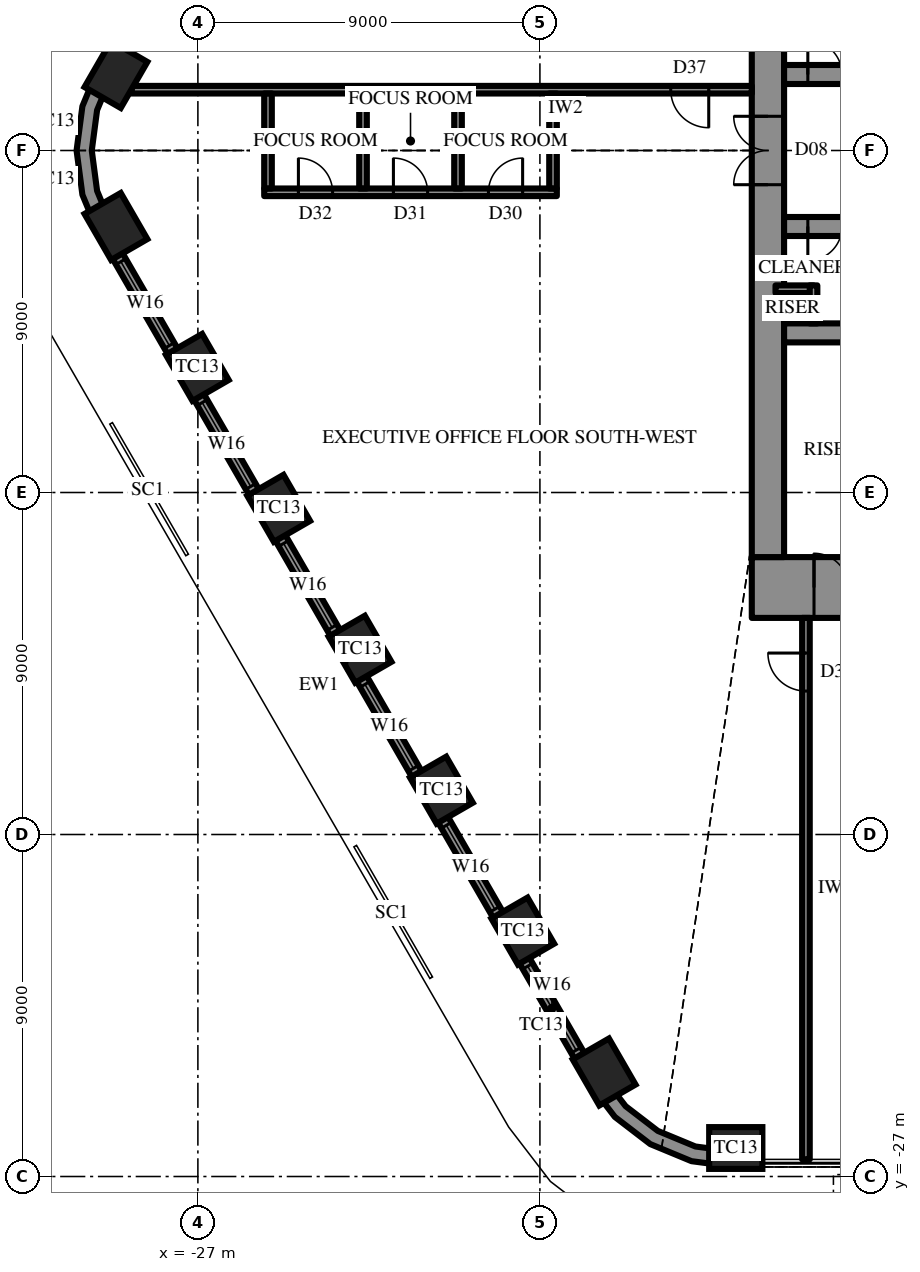
"""IFC4 building model, lengths in metres.
Left out: names, types, materials, properties, quantities, classifications, styles, units other than length and angle.
Written with IfcOpenShell. Run it as: python <this file> out.ifc"""

import sys

from ifc_helpers import new_model, si_unit, direction, frame, frame_2d, origin, origin_2d, place, context, subcontext, project, spatial, polyline, rectangle, outline, extrude, element, fill, save


model = new_model("IFC4")
c1 = context("Model", 3, precision=1e-05, world=origin(), true_north=direction((0.0, 1.0)))
c2 = subcontext(c1, "Body", "Model", "MODEL_VIEW")
j1 = project(units=[si_unit("LENGTHUNIT", "METRE"), si_unit("PLANEANGLEUNIT", "RADIAN")], contexts=[c1])
p1 = place(None, origin())
s1 = spatial("IfcSite", under=j1, at=p1, CompositionType="ELEMENT")
p2 = place(p1, origin())
s2 = spatial("IfcBuilding", under=s1, at=p2, CompositionType="ELEMENT")
p3 = place(p2, frame((0.0, 0.0, 324.1)))
s3 = spatial("IfcBuildingStorey", under=s2, at=p3, CompositionType="ELEMENT", Elevation=324.1)
for number, where, z_axis, x_axis in (
    (1, (-29.156, 2.0, 0.0), (0.0, 0.0, 1.0), (-0.5, -0.866, 0.0)),
    (2, (-29.156, -2.0, 0.0), (0.0, 0.0, 1.0), (0.5, -0.866, 0.0)),
    (3, (-27.015, -5.708, 0.0), (0.0, 0.0, 1.0), (0.5, -0.866, 0.0)),
    (4, (-24.874, -9.417, 0.0), (0.0, 0.0, 1.0), (0.5, -0.866, 0.0)),
    (5, (-22.733, -13.125, 0.0), (0.0, 0.0, 1.0), (0.5, -0.866, 0.0)),
    (6, (-20.592, -16.833, 0.0), (0.0, 0.0, 1.0), (0.5, -0.866, 0.0)),
    (7, (-18.451, -20.542, 0.0), (0.0, 0.0, 1.0), (0.5, -0.866, 0.0)),
    (8, (-16.31, -24.25, 0.0), (0.0, 0.0, 1.0), (0.5, -0.866, 0.0)),
    (9, (-12.846, -26.25, 0.0), (0.0, 0.0, 1.0), (1.0, 0.0, 0.0)),
):
    element("IfcColumn", number, at=place(p3, frame(where, z_axis=z_axis, x_axis=x_axis)), inside=s3, PredefinedType="COLUMN", context=c2, shape_type="SweptSolid", body=[
        extrude(rectangle(XDim=1.4, YDim=1.1, at=origin_2d()), origin(), (0.0, 0.0, 1.0), 4.2),
    ])
p4 = place(p3, frame((12.425, -11.5, 0.0), z_axis=(0.0, 0.0, 1.0), x_axis=(-1.0, 0.0, 0.0)))
e10 = element("IfcWall", 10, at=p4, inside=s3, PredefinedType="SHEAR", context=c2, shape_type="SweptSolid", body=[
    extrude(rectangle(XDim=24.85, YDim=1.6, at=frame_2d((12.425, 0.0))), origin(), (0.0, 0.0, 1.0), 4.2),
])
p5 = place(p4, frame((13.275, 0.0, 0.0)))
e11 = element("IfcOpeningElement", 11, at=p5, cuts=e10, PredefinedType="OPENING", context=c2, shape_type="SweptSolid", body=[
    extrude(rectangle(XDim=0.9, YDim=2.2, at=frame_2d((0.45, 1.1))), frame((0.0, 0.81, 0.0), z_axis=(0.0, -1.0, 0.0), x_axis=(1.0, 0.0, 0.0)), (0.0, 0.0, 1.0), 1.62),
])
p6 = place(p4, frame((16.275, 0.0, 0.0)))
e12 = element("IfcOpeningElement", 12, at=p6, cuts=e10, PredefinedType="OPENING", context=c2, shape_type="SweptSolid", body=[
    extrude(rectangle(XDim=0.9, YDim=2.2, at=frame_2d((0.45, 1.1))), frame((0.0, 0.81, 0.0), z_axis=(0.0, -1.0, 0.0), x_axis=(1.0, 0.0, 0.0)), (0.0, 0.0, 1.0), 1.62),
])
p7 = place(p4, frame((19.325, 0.0, 0.0)))
e13 = element("IfcOpeningElement", 13, at=p7, cuts=e10, PredefinedType="OPENING", context=c2, shape_type="SweptSolid", body=[
    extrude(rectangle(XDim=1.0, YDim=2.2, at=frame_2d((0.5, 1.1))), frame((0.0, 0.81, 0.0), z_axis=(0.0, -1.0, 0.0), x_axis=(1.0, 0.0, 0.0)), (0.0, 0.0, 1.0), 1.62),
])
p8 = place(p4, frame((1.637, 0.0, 0.0)))
e14 = element("IfcOpeningElement", 14, at=p8, cuts=e10, PredefinedType="OPENING", context=c2, shape_type="SweptSolid", body=[
    extrude(rectangle(XDim=0.9, YDim=2.2, at=frame_2d((0.45, 1.1))), frame((0.0, 0.81, 0.0), z_axis=(0.0, -1.0, 0.0), x_axis=(1.0, 0.0, 0.0)), (0.0, 0.0, 1.0), 1.62),
])
p9 = place(p4, frame((22.312, 0.0, 0.0)))
e15 = element("IfcOpeningElement", 15, at=p9, cuts=e10, PredefinedType="OPENING", context=c2, shape_type="SweptSolid", body=[
    extrude(rectangle(XDim=0.9, YDim=2.2, at=frame_2d((0.45, 1.1))), frame((0.0, 0.81, 0.0), z_axis=(0.0, -1.0, 0.0), x_axis=(1.0, 0.0, 0.0)), (0.0, 0.0, 1.0), 1.62),
])
p10 = place(p3, frame((-12.0, 10.7, 0.0), z_axis=(0.0, 0.0, 1.0), x_axis=(0.0, -1.0, 0.0)))
e16 = element("IfcWall", 16, at=p10, inside=s3, PredefinedType="SHEAR", context=c2, shape_type="SweptSolid", body=[
    extrude(rectangle(XDim=21.4, YDim=0.85, at=frame_2d((10.7, 0.0))), origin(), (0.0, 0.0, 1.0), 4.2),
])
p11 = place(p10, frame((9.8, 0.0, 0.0)))
e17 = element("IfcOpeningElement", 17, at=p11, cuts=e16, PredefinedType="OPENING", context=c2, shape_type="SweptSolid", body=[
    extrude(rectangle(XDim=1.8, YDim=2.4, at=frame_2d((0.9, 1.2))), frame((0.0, 0.435, 0.0), z_axis=(0.0, -1.0, 0.0), x_axis=(1.0, 0.0, 0.0)), (0.0, 0.0, 1.0), 0.87),
])
p12 = place(p3, frame((-11.575, 2.0, 0.0), z_axis=(0.0, 0.0, 1.0), x_axis=(1.0, 0.0, 0.0)))
e18 = element("IfcWall", 18, at=p12, inside=s3, PredefinedType="SHEAR", context=c2, shape_type="SweptSolid", body=[
    extrude(rectangle(XDim=5.775, YDim=0.5, at=frame_2d((2.887, 0.0))), origin(), (0.0, 0.0, 1.0), 4.2),
])
p13 = place(p12, frame((0.625, 0.0, 0.0)))
e19 = element("IfcOpeningElement", 19, at=p13, cuts=e18, PredefinedType="OPENING", context=c2, shape_type="SweptSolid", body=[
    extrude(rectangle(XDim=0.9, YDim=2.2, at=frame_2d((0.45, 1.1))), frame((0.0, 0.26, 0.0), z_axis=(0.0, -1.0, 0.0), x_axis=(1.0, 0.0, 0.0)), (0.0, 0.0, 1.0), 0.52),
])
p14 = place(p3, frame((3.2, -2.0, 0.0), z_axis=(0.0, 0.0, 1.0), x_axis=(-1.0, 0.0, 0.0)))
e20 = element("IfcWall", 20, at=p14, inside=s3, PredefinedType="SHEAR", context=c2, shape_type="SweptSolid", body=[
    extrude(rectangle(XDim=14.775, YDim=0.5, at=frame_2d((7.387, 0.0))), origin(), (0.0, 0.0, 1.0), 4.2),
])
p15 = place(p14, frame((13.25, 0.0, 0.0)))
e21 = element("IfcOpeningElement", 21, at=p15, cuts=e20, PredefinedType="OPENING", context=c2, shape_type="SweptSolid", body=[
    extrude(rectangle(XDim=0.9, YDim=2.2, at=frame_2d((0.45, 1.1))), frame((0.0, 0.26, 0.0), z_axis=(0.0, -1.0, 0.0), x_axis=(1.0, 0.0, 0.0)), (0.0, 0.0, 1.0), 0.52),
])
p16 = place(p14, frame((1.15, 0.0, 0.0)))
e22 = element("IfcOpeningElement", 22, at=p16, cuts=e20, PredefinedType="OPENING", context=c2, shape_type="SweptSolid", body=[
    extrude(rectangle(XDim=1.1, YDim=2.2, at=frame_2d((0.55, 1.1))), frame((0.0, 0.26, 0.0), z_axis=(0.0, -1.0, 0.0), x_axis=(1.0, 0.0, 0.0)), (0.0, 0.0, 1.0), 0.52),
])
p17 = place(p14, frame((4.15, 0.0, 0.0)))
e23 = element("IfcOpeningElement", 23, at=p17, cuts=e20, PredefinedType="OPENING", context=c2, shape_type="SweptSolid", body=[
    extrude(rectangle(XDim=1.1, YDim=2.2, at=frame_2d((0.55, 1.1))), frame((0.0, 0.26, 0.0), z_axis=(0.0, -1.0, 0.0), x_axis=(1.0, 0.0, 0.0)), (0.0, 0.0, 1.0), 0.52),
])
p18 = place(p14, frame((7.15, 0.0, 0.0)))
e24 = element("IfcOpeningElement", 24, at=p18, cuts=e20, PredefinedType="OPENING", context=c2, shape_type="SweptSolid", body=[
    extrude(rectangle(XDim=1.1, YDim=2.2, at=frame_2d((0.55, 1.1))), frame((0.0, 0.26, 0.0), z_axis=(0.0, -1.0, 0.0), x_axis=(1.0, 0.0, 0.0)), (0.0, 0.0, 1.0), 0.52),
])
p19 = place(p14, frame((10.15, 0.0, 0.0)))
e25 = element("IfcOpeningElement", 25, at=p19, cuts=e20, PredefinedType="OPENING", context=c2, shape_type="SweptSolid", body=[
    extrude(rectangle(XDim=1.1, YDim=2.2, at=frame_2d((0.55, 1.1))), frame((0.0, 0.26, 0.0), z_axis=(0.0, -1.0, 0.0), x_axis=(1.0, 0.0, 0.0)), (0.0, 0.0, 1.0), 0.52),
])
p20 = place(p3, frame((11.575, -4.8, 0.0), z_axis=(0.0, 0.0, 1.0), x_axis=(-1.0, 0.0, 0.0)))
e26 = element("IfcWall", 26, at=p20, inside=s3, PredefinedType="SHEAR", context=c2, shape_type="SweptSolid", body=[
    extrude(rectangle(XDim=23.15, YDim=0.5, at=frame_2d((11.575, 0.0))), origin(), (0.0, 0.0, 1.0), 4.2),
])
p21 = place(p20, frame((6.475, 0.0, 0.0)))
e27 = element("IfcOpeningElement", 27, at=p21, cuts=e26, PredefinedType="OPENING", context=c2, shape_type="SweptSolid", body=[
    extrude(rectangle(XDim=1.2, YDim=2.2, at=frame_2d((0.6, 1.1))), frame((0.0, 0.26, 0.0), z_axis=(0.0, -1.0, 0.0), x_axis=(1.0, 0.0, 0.0)), (0.0, 0.0, 1.0), 0.52),
])
p22 = place(p20, frame((3.475, 0.0, 0.0)))
e28 = element("IfcOpeningElement", 28, at=p22, cuts=e26, PredefinedType="OPENING", context=c2, shape_type="SweptSolid", body=[
    extrude(rectangle(XDim=1.2, YDim=2.2, at=frame_2d((0.6, 1.1))), frame((0.0, 0.26, 0.0), z_axis=(0.0, -1.0, 0.0), x_axis=(1.0, 0.0, 0.0)), (0.0, 0.0, 1.0), 0.52),
])
p23 = place(p3, origin())
e29 = element("IfcWall", 29, at=p23, inside=s3, PredefinedType="SOLIDWALL", context=c2, shape_type="SweptSolid", body=[
    extrude(outline(polyline([(-29.589, 2.25), (-30.039, 1.165), (-30.192, 0.0), (-30.039, -1.165), (-29.589, -2.25), (-29.243, -2.05), (-29.652, -1.061), (-29.792, 0.0), (-29.652, 1.061), (-29.243, 2.05), (-29.589, 2.25)])), origin(), (0.0, 0.0, 1.0), 2.0),
])
p24 = place(p3, origin())
e30 = element("IfcWall", 30, at=p24, inside=s3, PredefinedType="SOLIDWALL", context=c2, shape_type="SweptSolid", body=[
    extrude(outline(polyline([(-16.743, -24.5), (-16.028, -25.432), (-15.096, -26.147), (-14.011, -26.597), (-12.846, -26.75), (-12.846, -26.35), (-13.907, -26.21), (-14.896, -25.801), (-15.745, -25.149), (-16.397, -24.3), (-16.743, -24.5)])), origin(), (0.0, 0.0, 1.0), 2.0),
])
p25 = place(p3, frame((-29.459, -2.175, 0.0), z_axis=(0.0, 0.0, 1.0), x_axis=(0.499997191038, -0.866027025533, 0.0)))
e31 = element("IfcWall", 31, at=p25, inside=s3, PredefinedType="SOLIDWALL", context=c2, shape_type="SweptSolid", body=[
    extrude(rectangle(XDim=25.692, YDim=0.3, at=frame_2d((12.846, 0.0))), origin(), (0.0, 0.0, 1.0), 2.0),
])
p26 = place(p25, frame((0.866, 0.0, 0.6)))
e32 = element("IfcOpeningElement", 32, at=p26, cuts=e31, PredefinedType="OPENING", context=c2, shape_type="SweptSolid", body=[
    extrude(rectangle(XDim=2.55, YDim=1.15, at=frame_2d((1.275, 0.575))), frame((0.0, 0.16, 0.0), z_axis=(0.0, -1.0, 0.0), x_axis=(1.0, 0.0, 0.0)), (0.0, 0.0, 1.0), 0.32),
])
p27 = place(p25, frame((5.148, 0.0, 0.6)))
e33 = element("IfcOpeningElement", 33, at=p27, cuts=e31, PredefinedType="OPENING", context=c2, shape_type="SweptSolid", body=[
    extrude(rectangle(XDim=2.55, YDim=1.15, at=frame_2d((1.275, 0.575))), frame((0.0, 0.16, 0.0), z_axis=(0.0, -1.0, 0.0), x_axis=(1.0, 0.0, 0.0)), (0.0, 0.0, 1.0), 0.32),
])
p28 = place(p25, frame((9.43, 0.0, 0.6)))
e34 = element("IfcOpeningElement", 34, at=p28, cuts=e31, PredefinedType="OPENING", context=c2, shape_type="SweptSolid", body=[
    extrude(rectangle(XDim=2.55, YDim=1.15, at=frame_2d((1.275, 0.575))), frame((0.0, 0.16, 0.0), z_axis=(0.0, -1.0, 0.0), x_axis=(1.0, 0.0, 0.0)), (0.0, 0.0, 1.0), 0.32),
])
p29 = place(p25, frame((13.712, 0.0, 0.6)))
e35 = element("IfcOpeningElement", 35, at=p29, cuts=e31, PredefinedType="OPENING", context=c2, shape_type="SweptSolid", body=[
    extrude(rectangle(XDim=2.55, YDim=1.15, at=frame_2d((1.275, 0.575))), frame((0.0, 0.16, 0.0), z_axis=(0.0, -1.0, 0.0), x_axis=(1.0, 0.0, 0.0)), (0.0, 0.0, 1.0), 0.32),
])
p30 = place(p25, frame((17.994, 0.0, 0.6)))
e36 = element("IfcOpeningElement", 36, at=p30, cuts=e31, PredefinedType="OPENING", context=c2, shape_type="SweptSolid", body=[
    extrude(rectangle(XDim=2.55, YDim=1.15, at=frame_2d((1.275, 0.575))), frame((0.0, 0.16, 0.0), z_axis=(0.0, -1.0, 0.0), x_axis=(1.0, 0.0, 0.0)), (0.0, 0.0, 1.0), 0.32),
])
p31 = place(p25, frame((22.276, 0.0, 0.6)))
e37 = element("IfcOpeningElement", 37, at=p31, cuts=e31, PredefinedType="OPENING", context=c2, shape_type="SweptSolid", body=[
    extrude(rectangle(XDim=2.55, YDim=1.15, at=frame_2d((1.275, 0.575))), frame((0.0, 0.16, 0.0), z_axis=(0.0, -1.0, 0.0), x_axis=(1.0, 0.0, 0.0)), (0.0, 0.0, 1.0), 0.32),
])
for number, where, z_axis, x_axis in (
    (38, (-10.8, -3.65, 0.0), (0.0, 0.0, 1.0), (-1.0, 0.0, 0.0)),
    (39, (-10.8, -3.55, 0.0), (0.0, 0.0, 1.0), (0.0, -1.0, 0.0)),
):
    element("IfcWall", number, at=place(p3, frame(where, z_axis=z_axis, x_axis=x_axis)), inside=s3, PredefinedType="PARTITIONING", context=c2, shape_type="SweptSolid", body=[
        extrude(rectangle(XDim=1.0, YDim=0.2, at=frame_2d((0.5, 0.0))), origin(), (0.0, 0.0, 1.0), 4.0),
    ])
p32 = place(p3, frame((-11.0, -12.3, 0.0), z_axis=(0.0, 0.0, 1.0), x_axis=(0.0, -1.0, 0.0)))
e40 = element("IfcWall", 40, at=p32, inside=s3, PredefinedType="PARTITIONING", context=c2, shape_type="SweptSolid", body=[
    extrude(rectangle(XDim=14.25, YDim=0.2, at=frame_2d((7.125, 0.0))), origin(), (0.0, 0.0, 1.0), 4.0),
])
p33 = place(p32, frame((0.925, 0.0, 0.0)))
e41 = element("IfcOpeningElement", 41, at=p33, cuts=e40, PredefinedType="OPENING", context=c2, shape_type="SweptSolid", body=[
    extrude(rectangle(XDim=1.0, YDim=2.2, at=frame_2d((0.5, 1.1))), frame((0.0, 0.11, 0.0), z_axis=(0.0, -1.0, 0.0), x_axis=(1.0, 0.0, 0.0)), (0.0, 0.0, 1.0), 0.22),
])
p34 = place(p3, frame((-12.425, 1.6, 0.0), z_axis=(0.0, 0.0, 1.0), x_axis=(-1.0, 0.0, 0.0)))
e42 = element("IfcWall", 42, at=p34, inside=s3, PredefinedType="PARTITIONING", context=c2, shape_type="SweptSolid", body=[
    extrude(rectangle(XDim=16.327, YDim=0.2, at=frame_2d((8.164, 0.0))), origin(), (0.0, 0.0, 1.0), 4.0),
])
p35 = place(p34, frame((1.133, 0.0, 0.0)))
e43 = element("IfcOpeningElement", 43, at=p35, cuts=e42, PredefinedType="OPENING", context=c2, shape_type="SweptSolid", body=[
    extrude(rectangle(XDim=1.0, YDim=2.2, at=frame_2d((0.5, 1.1))), frame((0.0, 0.11, 0.0), z_axis=(0.0, -1.0, 0.0), x_axis=(1.0, 0.0, 0.0)), (0.0, 0.0, 1.0), 0.22),
])
p36 = place(p3, frame((-17.555, -1.1, 0.0), z_axis=(0.0, 0.0, 1.0), x_axis=(-1.0, 0.0, 0.0)))
e44 = element("IfcWall", 44, at=p36, inside=s3, PredefinedType="PARTITIONING", context=c2, shape_type="SweptSolid", body=[
    extrude(rectangle(XDim=7.7, YDim=0.2, at=frame_2d((3.85, 0.0))), origin(), (0.0, 0.0, 1.0), 4.0),
])
p37 = place(p36, frame((0.9, 0.0, 0.0)))
e45 = element("IfcOpeningElement", 45, at=p37, cuts=e44, PredefinedType="OPENING", context=c2, shape_type="SweptSolid", body=[
    extrude(rectangle(XDim=0.9, YDim=2.2, at=frame_2d((0.45, 1.1))), frame((0.0, 0.11, 0.0), z_axis=(0.0, -1.0, 0.0), x_axis=(1.0, 0.0, 0.0)), (0.0, 0.0, 1.0), 0.22),
])
p38 = place(p36, frame((3.4, 0.0, 0.0)))
e46 = element("IfcOpeningElement", 46, at=p38, cuts=e44, PredefinedType="OPENING", context=c2, shape_type="SweptSolid", body=[
    extrude(rectangle(XDim=0.9, YDim=2.2, at=frame_2d((0.45, 1.1))), frame((0.0, 0.11, 0.0), z_axis=(0.0, -1.0, 0.0), x_axis=(1.0, 0.0, 0.0)), (0.0, 0.0, 1.0), 0.22),
])
p39 = place(p36, frame((5.9, 0.0, 0.0)))
e47 = element("IfcOpeningElement", 47, at=p39, cuts=e44, PredefinedType="OPENING", context=c2, shape_type="SweptSolid", body=[
    extrude(rectangle(XDim=0.9, YDim=2.2, at=frame_2d((0.45, 1.1))), frame((0.0, 0.11, 0.0), z_axis=(0.0, -1.0, 0.0), x_axis=(1.0, 0.0, 0.0)), (0.0, 0.0, 1.0), 0.22),
])
for number, where, z_axis, x_axis in (
    (48, (-17.655, 1.5, 0.0), (0.0, 0.0, 1.0), (0.0, -1.0, 0.0)),
    (49, (-20.155, 1.5, 0.0), (0.0, 0.0, 1.0), (0.0, -1.0, 0.0)),
    (50, (-22.655, 1.5, 0.0), (0.0, 0.0, 1.0), (0.0, -1.0, 0.0)),
    (51, (-25.155, 1.5, 0.0), (0.0, 0.0, 1.0), (0.0, -1.0, 0.0)),
):
    element("IfcWall", number, at=place(p3, frame(where, z_axis=z_axis, x_axis=x_axis)), inside=s3, PredefinedType="PARTITIONING", context=c2, shape_type="SweptSolid", body=[
        extrude(rectangle(XDim=2.5, YDim=0.2, at=frame_2d((1.25, 0.0))), origin(), (0.0, 0.0, 1.0), 4.0),
    ])
p40 = place(p26, origin())
e52 = element("IfcWindow", 52, at=p40, inside=s3, PartitioningType="SINGLE_PANEL", PredefinedType="WINDOW", context=c2, shape_type="SweptSolid", body=[
    extrude(rectangle(XDim=2.55, YDim=1.15, at=frame_2d((1.275, 0.575))), frame((0.0, 0.03, 0.0), z_axis=(0.0, -1.0, 0.0), x_axis=(1.0, 0.0, 0.0)), (0.0, 0.0, 1.0), 0.06),
])
fill(e32, e52)
p41 = place(p27, origin())
e53 = element("IfcWindow", 53, at=p41, inside=s3, PartitioningType="SINGLE_PANEL", PredefinedType="WINDOW", context=c2, shape_type="SweptSolid", body=[
    extrude(rectangle(XDim=2.55, YDim=1.15, at=frame_2d((1.275, 0.575))), frame((0.0, 0.03, 0.0), z_axis=(0.0, -1.0, 0.0), x_axis=(1.0, 0.0, 0.0)), (0.0, 0.0, 1.0), 0.06),
])
fill(e33, e53)
p42 = place(p28, origin())
e54 = element("IfcWindow", 54, at=p42, inside=s3, PartitioningType="SINGLE_PANEL", PredefinedType="WINDOW", context=c2, shape_type="SweptSolid", body=[
    extrude(rectangle(XDim=2.55, YDim=1.15, at=frame_2d((1.275, 0.575))), frame((0.0, 0.03, 0.0), z_axis=(0.0, -1.0, 0.0), x_axis=(1.0, 0.0, 0.0)), (0.0, 0.0, 1.0), 0.06),
])
fill(e34, e54)
p43 = place(p29, origin())
e55 = element("IfcWindow", 55, at=p43, inside=s3, PartitioningType="SINGLE_PANEL", PredefinedType="WINDOW", context=c2, shape_type="SweptSolid", body=[
    extrude(rectangle(XDim=2.55, YDim=1.15, at=frame_2d((1.275, 0.575))), frame((0.0, 0.03, 0.0), z_axis=(0.0, -1.0, 0.0), x_axis=(1.0, 0.0, 0.0)), (0.0, 0.0, 1.0), 0.06),
])
fill(e35, e55)
p44 = place(p30, origin())
e56 = element("IfcWindow", 56, at=p44, inside=s3, PartitioningType="SINGLE_PANEL", PredefinedType="WINDOW", context=c2, shape_type="SweptSolid", body=[
    extrude(rectangle(XDim=2.55, YDim=1.15, at=frame_2d((1.275, 0.575))), frame((0.0, 0.03, 0.0), z_axis=(0.0, -1.0, 0.0), x_axis=(1.0, 0.0, 0.0)), (0.0, 0.0, 1.0), 0.06),
])
fill(e36, e56)
p45 = place(p31, origin())
e57 = element("IfcWindow", 57, at=p45, inside=s3, PartitioningType="SINGLE_PANEL", PredefinedType="WINDOW", context=c2, shape_type="SweptSolid", body=[
    extrude(rectangle(XDim=2.55, YDim=1.15, at=frame_2d((1.275, 0.575))), frame((0.0, 0.03, 0.0), z_axis=(0.0, -1.0, 0.0), x_axis=(1.0, 0.0, 0.0)), (0.0, 0.0, 1.0), 0.06),
])
fill(e37, e57)
p46 = place(p11, frame((1.8, 0.0, 0.0), z_axis=(0.0, 0.0, 1.0), x_axis=(-1.0, 0.0, 0.0)))
e58 = element("IfcDoor", 58, at=p46, inside=s3, OperationType="DOUBLE_DOOR_SINGLE_SWING", PredefinedType="DOOR", context=c2, shape_type="SweptSolid", body=[
    extrude(rectangle(XDim=1.8, YDim=2.4, at=frame_2d((0.9, 1.2))), frame((0.0, 0.025, 0.0), z_axis=(0.0, -1.0, 0.0), x_axis=(1.0, 0.0, 0.0)), (0.0, 0.0, 1.0), 0.05),
])
fill(e17, e58)
p47 = place(p9, frame((0.9, 0.0, 0.0), z_axis=(0.0, 0.0, 1.0), x_axis=(-1.0, 0.0, 0.0)))
e59 = element("IfcDoor", 59, at=p47, inside=s3, OperationType="SINGLE_SWING_RIGHT", PredefinedType="DOOR", context=c2, shape_type="SweptSolid", body=[
    extrude(rectangle(XDim=0.9, YDim=2.2, at=frame_2d((0.45, 1.1))), frame((0.0, 0.025, 0.0), z_axis=(0.0, -1.0, 0.0), x_axis=(1.0, 0.0, 0.0)), (0.0, 0.0, 1.0), 0.05),
])
fill(e15, e59)
p48 = place(p13, origin())
e60 = element("IfcDoor", 60, at=p48, inside=s3, OperationType="SINGLE_SWING_RIGHT", PredefinedType="DOOR", context=c2, shape_type="SweptSolid", body=[
    extrude(rectangle(XDim=0.9, YDim=2.2, at=frame_2d((0.45, 1.1))), frame((0.0, 0.025, 0.0), z_axis=(0.0, -1.0, 0.0), x_axis=(1.0, 0.0, 0.0)), (0.0, 0.0, 1.0), 0.05),
])
fill(e19, e60)
p49 = place(p15, origin())
e61 = element("IfcDoor", 61, at=p49, inside=s3, OperationType="SINGLE_SWING_LEFT", PredefinedType="DOOR", context=c2, shape_type="SweptSolid", body=[
    extrude(rectangle(XDim=0.9, YDim=2.2, at=frame_2d((0.45, 1.1))), frame((0.0, 0.025, 0.0), z_axis=(0.0, -1.0, 0.0), x_axis=(1.0, 0.0, 0.0)), (0.0, 0.0, 1.0), 0.05),
])
fill(e21, e61)
p50 = place(p33, frame((1.0, 0.0, 0.0), z_axis=(0.0, 0.0, 1.0), x_axis=(-1.0, 0.0, 0.0)))
e62 = element("IfcDoor", 62, at=p50, inside=s3, OperationType="SINGLE_SWING_LEFT", PredefinedType="DOOR", context=c2, shape_type="SweptSolid", body=[
    extrude(rectangle(XDim=1.0, YDim=2.2, at=frame_2d((0.5, 1.1))), frame((0.0, 0.025, 0.0), z_axis=(0.0, -1.0, 0.0), x_axis=(1.0, 0.0, 0.0)), (0.0, 0.0, 1.0), 0.05),
])
fill(e41, e62)
p51 = place(p35, origin())
e63 = element("IfcDoor", 63, at=p51, inside=s3, OperationType="SINGLE_SWING_RIGHT", PredefinedType="DOOR", context=c2, shape_type="SweptSolid", body=[
    extrude(rectangle(XDim=1.0, YDim=2.2, at=frame_2d((0.5, 1.1))), frame((0.0, 0.025, 0.0), z_axis=(0.0, -1.0, 0.0), x_axis=(1.0, 0.0, 0.0)), (0.0, 0.0, 1.0), 0.05),
])
fill(e43, e63)
p52 = place(p37, frame((0.9, 0.0, 0.0), z_axis=(0.0, 0.0, 1.0), x_axis=(-1.0, 0.0, 0.0)))
e64 = element("IfcDoor", 64, at=p52, inside=s3, OperationType="SINGLE_SWING_LEFT", PredefinedType="DOOR", context=c2, shape_type="SweptSolid", body=[
    extrude(rectangle(XDim=0.9, YDim=2.2, at=frame_2d((0.45, 1.1))), frame((0.0, 0.025, 0.0), z_axis=(0.0, -1.0, 0.0), x_axis=(1.0, 0.0, 0.0)), (0.0, 0.0, 1.0), 0.05),
])
fill(e45, e64)
p53 = place(p38, frame((0.9, 0.0, 0.0), z_axis=(0.0, 0.0, 1.0), x_axis=(-1.0, 0.0, 0.0)))
e65 = element("IfcDoor", 65, at=p53, inside=s3, OperationType="SINGLE_SWING_RIGHT", PredefinedType="DOOR", context=c2, shape_type="SweptSolid", body=[
    extrude(rectangle(XDim=0.9, YDim=2.2, at=frame_2d((0.45, 1.1))), frame((0.0, 0.025, 0.0), z_axis=(0.0, -1.0, 0.0), x_axis=(1.0, 0.0, 0.0)), (0.0, 0.0, 1.0), 0.05),
])
fill(e46, e65)
p54 = place(p39, frame((0.9, 0.0, 0.0), z_axis=(0.0, 0.0, 1.0), x_axis=(-1.0, 0.0, 0.0)))
e66 = element("IfcDoor", 66, at=p54, inside=s3, OperationType="SINGLE_SWING_RIGHT", PredefinedType="DOOR", context=c2, shape_type="SweptSolid", body=[
    extrude(rectangle(XDim=0.9, YDim=2.2, at=frame_2d((0.45, 1.1))), frame((0.0, 0.025, 0.0), z_axis=(0.0, -1.0, 0.0), x_axis=(1.0, 0.0, 0.0)), (0.0, 0.0, 1.0), 0.05),
])
fill(e47, e66)
save(model, sys.argv[1])
